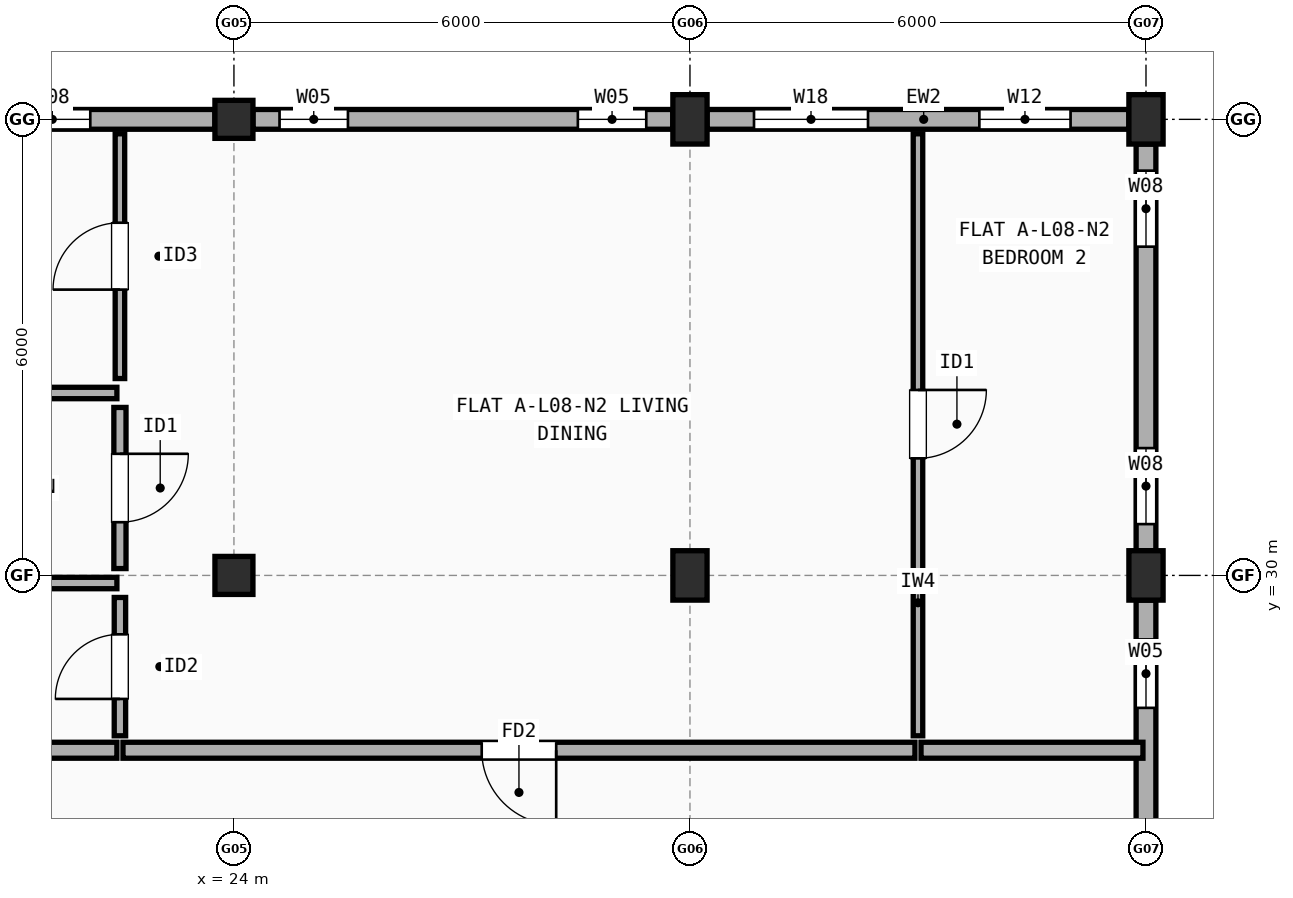
"""IFC4 building model, lengths in metres.
Left out: names, types, materials, properties, quantities, classifications, styles, units other than length and angle.
Written with IfcOpenShell. Run it as: python <this file> out.ifc"""

import sys

from ifc_helpers import new_model, si_unit, direction, frame, frame_2d, origin, origin_2d, place, context, subcontext, project, spatial, rectangle, extrude, element, fill, save


model = new_model("IFC4")
c1 = context("Model", 3, precision=1e-05, world=origin(), true_north=direction((0.0, 1.0)))
c2 = subcontext(c1, "Body", "Model", "MODEL_VIEW")
j1 = project(units=[si_unit("LENGTHUNIT", "METRE"), si_unit("PLANEANGLEUNIT", "RADIAN")], contexts=[c1])
p1 = place(None, origin())
s1 = spatial("IfcSite", under=j1, at=p1, CompositionType="ELEMENT")
p2 = place(p1, origin())
s2 = spatial("IfcBuilding", under=s1, at=p2, CompositionType="ELEMENT")
p3 = place(p2, frame((0.0, 0.0, 26.9)))
s3 = spatial("IfcBuildingStorey", under=s2, at=p3, CompositionType="ELEMENT", Elevation=26.9)
for number, where, z_axis, x_axis in (
    (1, (24.0, 30.0, 0.0), (0.0, 0.0, 1.0), (1.0, 0.0, 0.0)),
    (2, (24.0, 36.0, 0.0), (0.0, 0.0, 1.0), (1.0, 0.0, 0.0)),
):
    element("IfcColumn", number, at=place(p3, frame(where, z_axis=z_axis, x_axis=x_axis)), inside=s3, PredefinedType="COLUMN", context=c2, shape_type="SweptSolid", body=[
        extrude(rectangle(XDim=0.5, YDim=0.5, at=origin_2d()), origin(), (0.0, 0.0, 1.0), 2.98),
    ])
for number, where, z_axis, x_axis in (
    (3, (30.0, 30.0, 0.0), (0.0, 0.0, 1.0), (1.0, 0.0, 0.0)),
    (4, (30.0, 36.0, 0.0), (0.0, 0.0, 1.0), (1.0, 0.0, 0.0)),
    (5, (36.0, 30.0, 0.0), (0.0, 0.0, 1.0), (1.0, 0.0, 0.0)),
    (6, (36.0, 36.0, 0.0), (0.0, 0.0, 1.0), (1.0, 0.0, 0.0)),
):
    element("IfcColumn", number, at=place(p3, frame(where, z_axis=z_axis, x_axis=x_axis)), inside=s3, PredefinedType="COLUMN", context=c2, shape_type="SweptSolid", body=[
        extrude(rectangle(XDim=0.45, YDim=0.65, at=origin_2d()), origin(), (0.0, 0.0, 1.0), 2.98),
    ])
p4 = place(p3, frame((36.0, 24.325, 0.0), z_axis=(0.0, 0.0, 1.0), x_axis=(0.0, 1.0, 0.0)))
e7 = element("IfcWall", 7, at=p4, inside=s3, PredefinedType="STANDARD", context=c2, shape_type="SweptSolid", body=[
    extrude(rectangle(XDim=5.35, YDim=0.26, at=frame_2d((2.675, 0.0))), origin(), (0.0, 0.0, 1.0), 2.462),
])
p5 = place(p4, frame((1.218, 0.0, 0.9)))
e8 = element("IfcOpeningElement", 8, at=p5, cuts=e7, PredefinedType="OPENING", context=c2, shape_type="SweptSolid", body=[
    extrude(rectangle(XDim=0.9, YDim=1.4, at=frame_2d((0.45, 0.7))), frame((0.0, 0.14, 0.0), z_axis=(0.0, -1.0, 0.0), x_axis=(1.0, 0.0, 0.0)), (0.0, 0.0, 1.0), 0.28),
])
p6 = place(p4, frame((3.933, 0.0, 0.9)))
e9 = element("IfcOpeningElement", 9, at=p6, cuts=e7, PredefinedType="OPENING", context=c2, shape_type="SweptSolid", body=[
    extrude(rectangle(XDim=0.9, YDim=1.4, at=frame_2d((0.45, 0.7))), frame((0.0, 0.14, 0.0), z_axis=(0.0, -1.0, 0.0), x_axis=(1.0, 0.0, 0.0)), (0.0, 0.0, 1.0), 0.28),
])
p7 = place(p3, frame((36.0, 30.325, 0.0), z_axis=(0.0, 0.0, 1.0), x_axis=(0.0, 1.0, 0.0)))
e10 = element("IfcWall", 10, at=p7, inside=s3, PredefinedType="STANDARD", context=c2, shape_type="SweptSolid", body=[
    extrude(rectangle(XDim=5.35, YDim=0.26, at=frame_2d((2.675, 0.0))), origin(), (0.0, 0.0, 1.0), 2.462),
])
p8 = place(p7, frame((0.35, 0.0, 0.9)))
e11 = element("IfcOpeningElement", 11, at=p8, cuts=e10, PredefinedType="OPENING", context=c2, shape_type="SweptSolid", body=[
    extrude(rectangle(XDim=1.0, YDim=1.4, at=frame_2d((0.5, 0.7))), frame((0.0, 0.14, 0.0), z_axis=(0.0, -1.0, 0.0), x_axis=(1.0, 0.0, 0.0)), (0.0, 0.0, 1.0), 0.28),
])
p9 = place(p7, frame((4.0, 0.0, 0.9)))
e12 = element("IfcOpeningElement", 12, at=p9, cuts=e10, PredefinedType="OPENING", context=c2, shape_type="SweptSolid", body=[
    extrude(rectangle(XDim=1.0, YDim=1.4, at=frame_2d((0.5, 0.7))), frame((0.0, 0.14, 0.0), z_axis=(0.0, -1.0, 0.0), x_axis=(1.0, 0.0, 0.0)), (0.0, 0.0, 1.0), 0.28),
])
p10 = place(p3, frame((35.775, 36.0, 0.0), z_axis=(0.0, 0.0, 1.0), x_axis=(-1.0, 0.0, 0.0)))
e13 = element("IfcWall", 13, at=p10, inside=s3, PredefinedType="STANDARD", context=c2, shape_type="SweptSolid", body=[
    extrude(rectangle(XDim=5.55, YDim=0.26, at=frame_2d((2.775, 0.0))), origin(), (0.0, 0.0, 1.0), 2.462),
])
p11 = place(p10, frame((0.768, 0.0, 0.9)))
e14 = element("IfcOpeningElement", 14, at=p11, cuts=e13, PredefinedType="OPENING", context=c2, shape_type="SweptSolid", body=[
    extrude(rectangle(XDim=1.2, YDim=1.35, at=frame_2d((0.6, 0.675))), frame((0.0, 0.14, 0.0), z_axis=(0.0, -1.0, 0.0), x_axis=(1.0, 0.0, 0.0)), (0.0, 0.0, 1.0), 0.28),
])
p12 = place(p10, frame((3.433, 0.0, 0.9)))
e15 = element("IfcOpeningElement", 15, at=p12, cuts=e13, PredefinedType="OPENING", context=c2, shape_type="SweptSolid", body=[
    extrude(rectangle(XDim=1.5, YDim=1.4, at=frame_2d((0.75, 0.7))), frame((0.0, 0.14, 0.0), z_axis=(0.0, -1.0, 0.0), x_axis=(1.0, 0.0, 0.0)), (0.0, 0.0, 1.0), 0.28),
])
p13 = place(p3, frame((29.775, 36.0, 0.0), z_axis=(0.0, 0.0, 1.0), x_axis=(-1.0, 0.0, 0.0)))
e16 = element("IfcWall", 16, at=p13, inside=s3, PredefinedType="STANDARD", context=c2, shape_type="SweptSolid", body=[
    extrude(rectangle(XDim=5.525, YDim=0.26, at=frame_2d((2.762, 0.0))), origin(), (0.0, 0.0, 1.0), 2.462),
])
p14 = place(p13, frame((0.35, 0.0, 0.9)))
e17 = element("IfcOpeningElement", 17, at=p14, cuts=e16, PredefinedType="OPENING", context=c2, shape_type="SweptSolid", body=[
    extrude(rectangle(XDim=0.9, YDim=1.4, at=frame_2d((0.45, 0.7))), frame((0.0, 0.14, 0.0), z_axis=(0.0, -1.0, 0.0), x_axis=(1.0, 0.0, 0.0)), (0.0, 0.0, 1.0), 0.28),
])
p15 = place(p13, frame((4.275, 0.0, 0.9)))
e18 = element("IfcOpeningElement", 18, at=p15, cuts=e16, PredefinedType="OPENING", context=c2, shape_type="SweptSolid", body=[
    extrude(rectangle(XDim=0.9, YDim=1.4, at=frame_2d((0.45, 0.7))), frame((0.0, 0.14, 0.0), z_axis=(0.0, -1.0, 0.0), x_axis=(1.0, 0.0, 0.0)), (0.0, 0.0, 1.0), 0.28),
])
p16 = place(p3, frame((23.75, 36.0, 0.0), z_axis=(0.0, 0.0, 1.0), x_axis=(-1.0, 0.0, 0.0)))
e19 = element("IfcWall", 19, at=p16, inside=s3, PredefinedType="STANDARD", context=c2, shape_type="SweptSolid", body=[
    extrude(rectangle(XDim=5.5, YDim=0.26, at=frame_2d((2.75, 0.0))), origin(), (0.0, 0.0, 1.0), 2.462),
])
p17 = place(p16, frame((1.64, 0.0, 0.9)))
e20 = element("IfcOpeningElement", 20, at=p17, cuts=e19, PredefinedType="OPENING", context=c2, shape_type="SweptSolid", body=[
    extrude(rectangle(XDim=1.0, YDim=1.4, at=frame_2d((0.5, 0.7))), frame((0.0, 0.14, 0.0), z_axis=(0.0, -1.0, 0.0), x_axis=(1.0, 0.0, 0.0)), (0.0, 0.0, 1.0), 0.28),
])
p18 = place(p16, frame((4.15, 0.0, 0.9)))
e21 = element("IfcOpeningElement", 21, at=p18, cuts=e19, PredefinedType="OPENING", context=c2, shape_type="SweptSolid", body=[
    extrude(rectangle(XDim=1.0, YDim=1.4, at=frame_2d((0.5, 0.7))), frame((0.0, 0.14, 0.0), z_axis=(0.0, -1.0, 0.0), x_axis=(1.0, 0.0, 0.0)), (0.0, 0.0, 1.0), 0.28),
])
p19 = place(p3, frame((18.04, 27.7, 0.0), z_axis=(0.0, 0.0, 1.0), x_axis=(1.0, 0.0, 0.0)))
e22 = element("IfcWall", 22, at=p19, inside=s3, PredefinedType="SOLIDWALL", context=c2, shape_type="SweptSolid", body=[
    extrude(rectangle(XDim=4.42, YDim=0.21, at=frame_2d((2.21, 0.0))), origin(), (0.0, 0.0, 1.0), 2.98),
])
p20 = place(p3, frame((22.54, 27.7, 0.0), z_axis=(0.0, 0.0, 1.0), x_axis=(1.0, 0.0, 0.0)))
e23 = element("IfcWall", 23, at=p20, inside=s3, PredefinedType="SOLIDWALL", context=c2, shape_type="SweptSolid", body=[
    extrude(rectangle(XDim=10.42, YDim=0.21, at=frame_2d((5.21, 0.0))), origin(), (0.0, 0.0, 1.0), 2.462),
])
p21 = place(p20, frame((4.72, 0.0, 0.0)))
e24 = element("IfcOpeningElement", 24, at=p21, cuts=e23, PredefinedType="OPENING", context=c2, shape_type="SweptSolid", body=[
    extrude(rectangle(XDim=0.98, YDim=2.15, at=frame_2d((0.49, 1.075))), frame((0.0, 0.115, 0.0), z_axis=(0.0, -1.0, 0.0), x_axis=(1.0, 0.0, 0.0)), (0.0, 0.0, 1.0), 0.23),
])
p22 = place(p3, frame((22.5, 32.59, 0.0), z_axis=(0.0, 0.0, 1.0), x_axis=(0.0, 1.0, 0.0)))
e25 = element("IfcWall", 25, at=p22, inside=s3, PredefinedType="PARTITIONING", context=c2, shape_type="SweptSolid", body=[
    extrude(rectangle(XDim=3.22, YDim=0.125, at=frame_2d((1.61, 0.0))), origin(), (0.0, 0.0, 1.0), 2.98),
])
p23 = place(p22, frame((1.17, 0.0, 0.0)))
e26 = element("IfcOpeningElement", 26, at=p23, cuts=e25, PredefinedType="OPENING", context=c2, shape_type="SweptSolid", body=[
    extrude(rectangle(XDim=0.88, YDim=2.1, at=frame_2d((0.44, 1.05))), frame((0.0, 0.073, 0.0), z_axis=(0.0, -1.0, 0.0), x_axis=(1.0, 0.0, 0.0)), (0.0, 0.0, 1.0), 0.145),
])
p24 = place(p3, frame((22.5, 30.09, 0.0), z_axis=(0.0, 0.0, 1.0), x_axis=(0.0, 1.0, 0.0)))
e27 = element("IfcWall", 27, at=p24, inside=s3, PredefinedType="PLUMBINGWALL", context=c2, shape_type="SweptSolid", body=[
    extrude(rectangle(XDim=2.12, YDim=0.16, at=frame_2d((1.06, 0.0))), origin(), (0.0, 0.0, 1.0), 2.462),
])
p25 = place(p24, frame((0.61, 0.0, 0.0)))
e28 = element("IfcOpeningElement", 28, at=p25, cuts=e27, PredefinedType="OPENING", context=c2, shape_type="SweptSolid", body=[
    extrude(rectangle(XDim=0.9, YDim=2.1, at=frame_2d((0.45, 1.05))), frame((0.0, 0.09, 0.0), z_axis=(0.0, -1.0, 0.0), x_axis=(1.0, 0.0, 0.0)), (0.0, 0.0, 1.0), 0.18),
])
p26 = place(p3, frame((22.5, 27.89, 0.0), z_axis=(0.0, 0.0, 1.0), x_axis=(0.0, 1.0, 0.0)))
e29 = element("IfcWall", 29, at=p26, inside=s3, PredefinedType="PARTITIONING", context=c2, shape_type="SweptSolid", body=[
    extrude(rectangle(XDim=1.82, YDim=0.15, at=frame_2d((0.91, 0.0))), origin(), (0.0, 0.0, 1.0), 2.98),
])
p27 = place(p26, frame((0.485, 0.0, 0.0)))
e30 = element("IfcOpeningElement", 30, at=p27, cuts=e29, PredefinedType="OPENING", context=c2, shape_type="SweptSolid", body=[
    extrude(rectangle(XDim=0.85, YDim=2.1, at=frame_2d((0.425, 1.05))), frame((0.0, 0.085, 0.0), z_axis=(0.0, -1.0, 0.0), x_axis=(1.0, 0.0, 0.0)), (0.0, 0.0, 1.0), 0.17),
])
p28 = place(p3, frame((18.04, 32.4, 0.0), z_axis=(0.0, 0.0, 1.0), x_axis=(1.0, 0.0, 0.0)))
e31 = element("IfcWall", 31, at=p28, inside=s3, PredefinedType="PARTITIONING", context=c2, shape_type="SweptSolid", body=[
    extrude(rectangle(XDim=4.42, YDim=0.15, at=frame_2d((2.21, 0.0))), origin(), (0.0, 0.0, 1.0), 2.458),
])
p29 = place(p3, frame((18.36, 29.9, 0.0), z_axis=(0.0, 0.0, 1.0), x_axis=(1.0, 0.0, 0.0)))
e32 = element("IfcWall", 32, at=p29, inside=s3, PredefinedType="PARTITIONING", context=c2, shape_type="SweptSolid", body=[
    extrude(rectangle(XDim=4.1, YDim=0.15, at=frame_2d((2.05, 0.0))), origin(), (0.0, 0.0, 1.0), 2.462),
])
p30 = place(p3, frame((33.04, 27.7, 0.0), z_axis=(0.0, 0.0, 1.0), x_axis=(1.0, 0.0, 0.0)))
e33 = element("IfcWall", 33, at=p30, inside=s3, PredefinedType="SOLIDWALL", context=c2, shape_type="SweptSolid", body=[
    extrude(rectangle(XDim=2.92, YDim=0.21, at=frame_2d((1.46, 0.0))), origin(), (0.0, 0.0, 1.0), 2.462),
])
p31 = place(p3, frame((33.0, 27.89, 0.0), z_axis=(0.0, 0.0, 1.0), x_axis=(0.0, 1.0, 0.0)))
e34 = element("IfcWall", 34, at=p31, inside=s3, PredefinedType="PARTITIONING", context=c2, shape_type="SweptSolid", body=[
    extrude(rectangle(XDim=7.92, YDim=0.125, at=frame_2d((3.96, 0.0))), origin(), (0.0, 0.0, 1.0), 2.462),
])
p32 = place(p31, frame((3.65, 0.0, 0.0)))
e35 = element("IfcOpeningElement", 35, at=p32, cuts=e34, PredefinedType="OPENING", context=c2, shape_type="SweptSolid", body=[
    extrude(rectangle(XDim=0.9, YDim=2.1, at=frame_2d((0.45, 1.05))), frame((0.0, 0.073, 0.0), z_axis=(0.0, -1.0, 0.0), x_axis=(1.0, 0.0, 0.0)), (0.0, 0.0, 1.0), 0.145),
])
p33 = place(p6, origin())
e36 = element("IfcWindow", 36, at=p33, inside=s3, PartitioningType="SINGLE_PANEL", PredefinedType="WINDOW", context=c2, shape_type="SweptSolid", body=[
    extrude(rectangle(XDim=0.9, YDim=1.4, at=frame_2d((0.45, 0.7))), frame((0.0, 0.03, 0.0), z_axis=(0.0, -1.0, 0.0), x_axis=(1.0, 0.0, 0.0)), (0.0, 0.0, 1.0), 0.06),
])
fill(e9, e36)
p34 = place(p8, origin())
e37 = element("IfcWindow", 37, at=p34, inside=s3, PartitioningType="SINGLE_PANEL", PredefinedType="WINDOW", context=c2, shape_type="SweptSolid", body=[
    extrude(rectangle(XDim=1.0, YDim=1.4, at=frame_2d((0.5, 0.7))), frame((0.0, 0.03, 0.0), z_axis=(0.0, -1.0, 0.0), x_axis=(1.0, 0.0, 0.0)), (0.0, 0.0, 1.0), 0.06),
])
fill(e11, e37)
p35 = place(p9, origin())
e38 = element("IfcWindow", 38, at=p35, inside=s3, PartitioningType="SINGLE_PANEL", PredefinedType="WINDOW", context=c2, shape_type="SweptSolid", body=[
    extrude(rectangle(XDim=1.0, YDim=1.4, at=frame_2d((0.5, 0.7))), frame((0.0, 0.03, 0.0), z_axis=(0.0, -1.0, 0.0), x_axis=(1.0, 0.0, 0.0)), (0.0, 0.0, 1.0), 0.06),
])
fill(e12, e38)
p36 = place(p11, origin())
e39 = element("IfcWindow", 39, at=p36, inside=s3, PartitioningType="SINGLE_PANEL", PredefinedType="WINDOW", context=c2, shape_type="SweptSolid", body=[
    extrude(rectangle(XDim=1.2, YDim=1.35, at=frame_2d((0.6, 0.675))), frame((0.0, 0.03, 0.0), z_axis=(0.0, -1.0, 0.0), x_axis=(1.0, 0.0, 0.0)), (0.0, 0.0, 1.0), 0.06),
])
fill(e14, e39)
p37 = place(p12, origin())
e40 = element("IfcWindow", 40, at=p37, inside=s3, PartitioningType="SINGLE_PANEL", PredefinedType="WINDOW", context=c2, shape_type="SweptSolid", body=[
    extrude(rectangle(XDim=1.5, YDim=1.4, at=frame_2d((0.75, 0.7))), frame((0.0, 0.03, 0.0), z_axis=(0.0, -1.0, 0.0), x_axis=(1.0, 0.0, 0.0)), (0.0, 0.0, 1.0), 0.06),
])
fill(e15, e40)
p38 = place(p14, origin())
e41 = element("IfcWindow", 41, at=p38, inside=s3, PartitioningType="SINGLE_PANEL", PredefinedType="WINDOW", context=c2, shape_type="SweptSolid", body=[
    extrude(rectangle(XDim=0.9, YDim=1.4, at=frame_2d((0.45, 0.7))), frame((0.0, 0.03, 0.0), z_axis=(0.0, -1.0, 0.0), x_axis=(1.0, 0.0, 0.0)), (0.0, 0.0, 1.0), 0.06),
])
fill(e17, e41)
p39 = place(p15, origin())
e42 = element("IfcWindow", 42, at=p39, inside=s3, PartitioningType="SINGLE_PANEL", PredefinedType="WINDOW", context=c2, shape_type="SweptSolid", body=[
    extrude(rectangle(XDim=0.9, YDim=1.4, at=frame_2d((0.45, 0.7))), frame((0.0, 0.03, 0.0), z_axis=(0.0, -1.0, 0.0), x_axis=(1.0, 0.0, 0.0)), (0.0, 0.0, 1.0), 0.06),
])
fill(e18, e42)
p40 = place(p17, origin())
e43 = element("IfcWindow", 43, at=p40, inside=s3, PartitioningType="SINGLE_PANEL", PredefinedType="WINDOW", context=c2, shape_type="SweptSolid", body=[
    extrude(rectangle(XDim=1.0, YDim=1.4, at=frame_2d((0.5, 0.7))), frame((0.0, 0.03, 0.0), z_axis=(0.0, -1.0, 0.0), x_axis=(1.0, 0.0, 0.0)), (0.0, 0.0, 1.0), 0.06),
])
fill(e20, e43)
p41 = place(p21, origin())
e44 = element("IfcDoor", 44, at=p41, inside=s3, OperationType="SINGLE_SWING_RIGHT", PredefinedType="DOOR", context=c2, shape_type="SweptSolid", body=[
    extrude(rectangle(XDim=0.98, YDim=2.15, at=frame_2d((0.49, 1.075))), frame((0.0, 0.025, 0.0), z_axis=(0.0, -1.0, 0.0), x_axis=(1.0, 0.0, 0.0)), (0.0, 0.0, 1.0), 0.05),
])
fill(e24, e44)
p42 = place(p23, origin())
e45 = element("IfcDoor", 45, at=p42, inside=s3, OperationType="SINGLE_SWING_LEFT", PredefinedType="DOOR", context=c2, shape_type="SweptSolid", body=[
    extrude(rectangle(XDim=0.88, YDim=2.1, at=frame_2d((0.44, 1.05))), frame((0.0, 0.025, 0.0), z_axis=(0.0, -1.0, 0.0), x_axis=(1.0, 0.0, 0.0)), (0.0, 0.0, 1.0), 0.05),
])
fill(e26, e45)
p43 = place(p25, origin())
e46 = element("IfcDoor", 46, at=p43, inside=s3, OperationType="SINGLE_SWING_RIGHT", PredefinedType="DOOR", context=c2, shape_type="SweptSolid", body=[
    extrude(rectangle(XDim=0.9, YDim=2.1, at=frame_2d((0.45, 1.05))), frame((0.0, 0.025, 0.0), z_axis=(0.0, -1.0, 0.0), x_axis=(1.0, 0.0, 0.0)), (0.0, 0.0, 1.0), 0.05),
])
fill(e28, e46)
p44 = place(p27, origin())
e47 = element("IfcDoor", 47, at=p44, inside=s3, OperationType="SINGLE_SWING_LEFT", PredefinedType="DOOR", context=c2, shape_type="SweptSolid", body=[
    extrude(rectangle(XDim=0.85, YDim=2.1, at=frame_2d((0.425, 1.05))), frame((0.0, 0.025, 0.0), z_axis=(0.0, -1.0, 0.0), x_axis=(1.0, 0.0, 0.0)), (0.0, 0.0, 1.0), 0.05),
])
fill(e30, e47)
p45 = place(p32, origin())
e48 = element("IfcDoor", 48, at=p45, inside=s3, OperationType="SINGLE_SWING_RIGHT", PredefinedType="DOOR", context=c2, shape_type="SweptSolid", body=[
    extrude(rectangle(XDim=0.9, YDim=2.1, at=frame_2d((0.45, 1.05))), frame((0.0, 0.025, 0.0), z_axis=(0.0, -1.0, 0.0), x_axis=(1.0, 0.0, 0.0)), (0.0, 0.0, 1.0), 0.05),
])
fill(e35, e48)
save(model, sys.argv[1])
